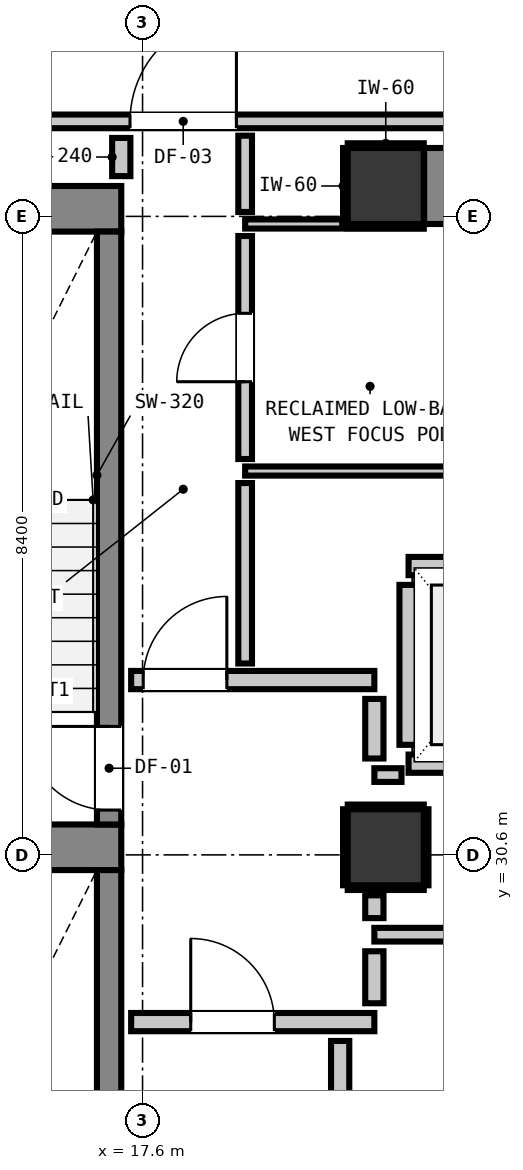
"""IFC4 building model, lengths in metres.
Left out: names, types, materials, properties, quantities, classifications, styles, units other than length and angle.
Written with IfcOpenShell. Run it as: python <this file> out.ifc"""

import sys

from ifc_helpers import new_model, si_unit, direction, frame, frame_2d, origin, origin_2d, place, context, subcontext, project, spatial, rectangle, extrude, element, fill, save


model = new_model("IFC4")
c1 = context("Model", 3, precision=1e-05, world=origin(), true_north=direction((0.0, 1.0)))
c2 = subcontext(c1, "Body", "Model", "MODEL_VIEW")
j1 = project(units=[si_unit("LENGTHUNIT", "METRE"), si_unit("PLANEANGLEUNIT", "RADIAN")], contexts=[c1])
p1 = place(None, origin())
s1 = spatial("IfcSite", under=j1, at=p1, CompositionType="ELEMENT")
p2 = place(p1, origin())
s2 = spatial("IfcBuilding", under=s1, at=p2, CompositionType="ELEMENT")
p3 = place(p2, frame((0.0, 0.0, 165.84)))
s3 = spatial("IfcBuildingStorey", under=s2, at=p3, CompositionType="ELEMENT", Elevation=165.84)
p4 = place(p3, frame((20.8, 39.4, 0.0), z_axis=(0.0, 0.0, 1.0), x_axis=(1.0, 0.0, 0.0)))
e1 = element("IfcColumn", 1, at=p4, inside=s3, PredefinedType="COLUMN", context=c2, shape_type="SweptSolid", body=[
    extrude(rectangle(XDim=1.0, YDim=1.0, at=origin_2d()), origin(), (0.0, 0.0, 1.0), 3.32),
])
p5 = place(p3, frame((13.24, 39.1, 0.0), z_axis=(0.0, 0.0, 1.0), x_axis=(1.0, 0.0, 0.0)))
e2 = element("IfcWall", 2, at=p5, inside=s3, PredefinedType="SHEAR", context=c2, shape_type="SweptSolid", body=[
    extrude(rectangle(XDim=4.08, YDim=0.6, at=frame_2d((2.04, 0.0))), origin(), (0.0, 0.0, 1.0), 3.32),
])
p6 = place(p3, frame((13.905, 30.7, 0.0), z_axis=(0.0, 0.0, 1.0), x_axis=(1.0, 0.0, 0.0)))
e3 = element("IfcWall", 3, at=p6, inside=s3, PredefinedType="SHEAR", context=c2, shape_type="SweptSolid", body=[
    extrude(rectangle(XDim=3.415, YDim=0.6, at=frame_2d((1.708, 0.0))), origin(), (0.0, 0.0, 1.0), 3.32),
])
p7 = place(p3, frame((21.305, 39.4, 0.0), z_axis=(0.0, 0.0, 1.0), x_axis=(1.0, 0.0, 0.0)))
e4 = element("IfcWall", 4, at=p7, inside=s3, PredefinedType="SHEAR", context=c2, shape_type="SweptSolid", body=[
    extrude(rectangle(XDim=7.39, YDim=1.0, at=frame_2d((3.695, 0.0))), origin(), (0.0, 0.0, 1.0), 3.32),
])
p8 = place(p3, frame((17.16, 31.0, 0.0), z_axis=(0.0, 0.0, 1.0), x_axis=(0.0, 1.0, 0.0)))
e5 = element("IfcWall", 5, at=p8, inside=s3, PredefinedType="SHEAR", context=c2, shape_type="SweptSolid", body=[
    extrude(rectangle(XDim=7.8, YDim=0.32, at=frame_2d((3.9, 0.0))), origin(), (0.0, 0.0, 1.0), 3.32),
])
p9 = place(p8, frame((0.19, 0.0, 0.0)))
e6 = element("IfcOpeningElement", 6, at=p9, cuts=e5, PredefinedType="OPENING", context=c2, shape_type="SweptSolid", body=[
    extrude(rectangle(XDim=1.1, YDim=2.15, at=frame_2d((0.55, 1.075))), frame((0.0, 0.17, 0.0), z_axis=(0.0, -1.0, 0.0), x_axis=(1.0, 0.0, 0.0)), (0.0, 0.0, 1.0), 0.34),
])
p10 = place(p3, frame((17.16, 22.5, 0.0), z_axis=(0.0, 0.0, 1.0), x_axis=(0.0, 1.0, 0.0)))
e7 = element("IfcWall", 7, at=p10, inside=s3, PredefinedType="SHEAR", context=c2, shape_type="SweptSolid", body=[
    extrude(rectangle(XDim=7.9, YDim=0.32, at=frame_2d((3.95, 0.0))), origin(), (0.0, 0.0, 1.0), 3.32),
])
p11 = place(p10, frame((0.29, 0.0, 0.0)))
e8 = element("IfcOpeningElement", 8, at=p11, cuts=e7, PredefinedType="OPENING", context=c2, shape_type="SweptSolid", body=[
    extrude(rectangle(XDim=1.1, YDim=2.15, at=frame_2d((0.55, 1.075))), frame((0.0, 0.17, 0.0), z_axis=(0.0, -1.0, 0.0), x_axis=(1.0, 0.0, 0.0)), (0.0, 0.0, 1.0), 0.34),
])
p12 = place(p3, frame((20.8, 30.7, 0.0), z_axis=(0.0, 0.0, 1.0), x_axis=(1.0, 0.0, 0.0)))
e9 = element("IfcColumn", 9, at=p12, inside=s3, PredefinedType="COLUMN", context=c2, shape_type="SweptSolid", body=[
    extrude(rectangle(XDim=1.0, YDim=1.0, at=origin_2d()), origin(), (0.0, 0.0, 1.0), 3.32),
])
for number, where, z_axis, x_axis in (
    (10, (21.1, 31.8, 0.0), (0.0, 0.0, 1.0), (1.0, 0.0, 0.0)),
    (11, (21.1, 34.4, 0.0), (0.0, 0.0, 1.0), (1.0, 0.0, 0.0)),
):
    element("IfcWall", number, at=place(p3, frame(where, z_axis=z_axis, x_axis=x_axis)), inside=s3, PredefinedType="PARTITIONING", context=c2, shape_type="SweptSolid", body=[
        extrude(rectangle(XDim=2.2, YDim=0.24, at=frame_2d((1.1, 0.0))), origin(), (0.0, 0.0, 1.0), 3.08),
    ])
p13 = place(p3, frame((21.1, 32.048, 0.0), z_axis=(0.0, 0.0, 1.0), x_axis=(0.0, 1.0, 0.0)))
e12 = element("IfcWall", 12, at=p13, inside=s3, PredefinedType="PARTITIONING", context=c2, shape_type="SweptSolid", body=[
    extrude(rectangle(XDim=2.104, YDim=0.24, at=frame_2d((1.052, 0.0))), origin(), (0.0, 0.0, 1.0), 2.315),
])
p14 = place(p3, frame((17.45, 28.4, 0.0), z_axis=(0.0, 0.0, 1.0), x_axis=(1.0, 0.0, 0.0)))
e13 = element("IfcWall", 13, at=p14, inside=s3, PredefinedType="PARTITIONING", context=c2, shape_type="SweptSolid", body=[
    extrude(rectangle(XDim=3.2, YDim=0.24, at=frame_2d((1.6, 0.0))), origin(), (0.0, 0.0, 1.0), 3.08),
])
p15 = place(p14, frame((0.784, 0.0, 0.0)))
e14 = element("IfcOpeningElement", 14, at=p15, cuts=e13, PredefinedType="OPENING", context=c2, shape_type="SweptSolid", body=[
    extrude(rectangle(XDim=1.1, YDim=2.15, at=frame_2d((0.55, 1.075))), frame((0.0, 0.13, 0.0), z_axis=(0.0, -1.0, 0.0), x_axis=(1.0, 0.0, 0.0)), (0.0, 0.0, 1.0), 0.26),
])
p16 = place(p3, frame((17.45, 32.9, 0.0), z_axis=(0.0, 0.0, 1.0), x_axis=(1.0, 0.0, 0.0)))
e15 = element("IfcWall", 15, at=p16, inside=s3, PredefinedType="PARTITIONING", context=c2, shape_type="SweptSolid", body=[
    extrude(rectangle(XDim=3.2, YDim=0.24, at=frame_2d((1.6, 0.0))), origin(), (0.0, 0.0, 1.0), 3.08),
])
p17 = place(p16, frame((0.159, 0.0, 0.0)))
e16 = element("IfcOpeningElement", 16, at=p17, cuts=e15, PredefinedType="OPENING", context=c2, shape_type="SweptSolid", body=[
    extrude(rectangle(XDim=1.1, YDim=2.15, at=frame_2d((0.55, 1.075))), frame((0.0, 0.13, 0.0), z_axis=(0.0, -1.0, 0.0), x_axis=(1.0, 0.0, 0.0)), (0.0, 0.0, 1.0), 0.26),
])
p18 = place(p3, frame((20.65, 29.55, 0.0), z_axis=(0.0, 0.0, 1.0), x_axis=(1.0, 0.0, 0.0)))
e17 = element("IfcWall", 17, at=p18, inside=s3, PredefinedType="PARTITIONING", context=c2, shape_type="SweptSolid", body=[
    extrude(rectangle(XDim=9.325, YDim=0.18, at=frame_2d((4.663, 0.0))), origin(), (0.0, 0.0, 1.0), 3.08),
])
p19 = place(p3, frame((20.65, 31.65, 0.0), z_axis=(0.0, 0.0, 1.0), x_axis=(1.0, 0.0, 0.0)))
e18 = element("IfcWall", 18, at=p19, inside=s3, PredefinedType="PARTITIONING", context=c2, shape_type="SweptSolid", body=[
    extrude(rectangle(XDim=0.357, YDim=0.18, at=frame_2d((0.179, 0.0))), origin(), (0.0, 0.0, 1.0), 3.08),
])
p20 = place(p3, frame((3.207, 40.25, 0.0), z_axis=(0.0, 0.0, 1.0), x_axis=(1.0, 0.0, 0.0)))
e19 = element("IfcWall", 19, at=p20, inside=s3, PredefinedType="PARTITIONING", context=c2, shape_type="SweptSolid", body=[
    extrude(rectangle(XDim=39.386, YDim=0.18, at=frame_2d((19.693, 0.0))), origin(), (0.0, 0.0, 1.0), 3.08),
])
p21 = place(p20, frame((14.228, 0.0, 0.0)))
e20 = element("IfcOpeningElement", 20, at=p21, cuts=e19, PredefinedType="OPENING", context=c2, shape_type="SweptSolid", body=[
    extrude(rectangle(XDim=1.4, YDim=2.15, at=frame_2d((0.7, 1.075))), frame((0.0, 0.1, 0.0), z_axis=(0.0, -1.0, 0.0), x_axis=(1.0, 0.0, 0.0)), (0.0, 0.0, 1.0), 0.2),
])
p22 = place(p20, frame((7.243, 0.0, 0.0)))
e21 = element("IfcOpeningElement", 21, at=p22, cuts=e19, PredefinedType="OPENING", context=c2, shape_type="SweptSolid", body=[
    extrude(rectangle(XDim=1.4, YDim=2.15, at=frame_2d((0.7, 1.075))), frame((0.0, 0.1, 0.0), z_axis=(0.0, -1.0, 0.0), x_axis=(1.0, 0.0, 0.0)), (0.0, 0.0, 1.0), 0.2),
])
p23 = place(p20, frame((34.843, 0.0, 0.0)))
e22 = element("IfcOpeningElement", 22, at=p23, cuts=e19, PredefinedType="OPENING", context=c2, shape_type="SweptSolid", body=[
    extrude(rectangle(XDim=1.4, YDim=2.15, at=frame_2d((0.7, 1.075))), frame((0.0, 0.1, 0.0), z_axis=(0.0, -1.0, 0.0), x_axis=(1.0, 0.0, 0.0)), (0.0, 0.0, 1.0), 0.2),
])
p24 = place(p3, frame((18.95, 35.65, 0.0), z_axis=(0.0, 0.0, 1.0), x_axis=(1.0, 0.0, 0.0)))
e23 = element("IfcWall", 23, at=p24, inside=s3, PredefinedType="PARTITIONING", context=c2, shape_type="SweptSolid", body=[
    extrude(rectangle(XDim=11.025, YDim=0.12, at=frame_2d((5.513, 0.0))), origin(), (0.0, 0.0, 1.0), 3.08),
])
p25 = place(p3, frame((18.95, 38.9, 0.0), z_axis=(0.0, 0.0, 1.0), x_axis=(1.0, 0.0, 0.0)))
e24 = element("IfcWall", 24, at=p25, inside=s3, PredefinedType="PARTITIONING", context=c2, shape_type="SweptSolid", body=[
    extrude(rectangle(XDim=1.278, YDim=0.12, at=frame_2d((0.639, 0.0))), origin(), (0.0, 0.0, 1.0), 3.08),
])
p26 = place(p3, frame((17.32, 39.53, 0.0), z_axis=(0.0, 0.0, 1.0), x_axis=(0.0, 1.0, 0.0)))
e25 = element("IfcWall", 25, at=p26, inside=s3, PredefinedType="PARTITIONING", context=c2, shape_type="SweptSolid", body=[
    extrude(rectangle(XDim=0.502, YDim=0.24, at=frame_2d((0.251, 0.0))), origin(), (0.0, 0.0, 1.0), 3.08),
])
p27 = place(p3, frame((20.2, 22.586, 0.0), z_axis=(0.0, 0.0, 1.0), x_axis=(0.0, 1.0, 0.0)))
e26 = element("IfcWall", 26, at=p27, inside=s3, PredefinedType="PARTITIONING", context=c2, shape_type="SweptSolid", body=[
    extrude(rectangle(XDim=5.566, YDim=0.24, at=frame_2d((2.783, 0.0))), origin(), (0.0, 0.0, 1.0), 3.08),
])
p28 = place(p3, frame((20.65, 28.648, 0.0), z_axis=(0.0, 0.0, 1.0), x_axis=(0.0, 1.0, 0.0)))
e27 = element("IfcWall", 27, at=p28, inside=s3, PredefinedType="PARTITIONING", context=c2, shape_type="SweptSolid", body=[
    extrude(rectangle(XDim=0.684, YDim=0.24, at=frame_2d((0.342, 0.0))), origin(), (0.0, 0.0, 1.0), 2.315),
])
p29 = place(p3, frame((20.65, 29.768, 0.0), z_axis=(0.0, 0.0, 1.0), x_axis=(0.0, 1.0, 0.0)))
e28 = element("IfcWall", 28, at=p29, inside=s3, PredefinedType="PARTITIONING", context=c2, shape_type="SweptSolid", body=[
    extrude(rectangle(XDim=0.3, YDim=0.24, at=frame_2d((0.15, 0.0))), origin(), (0.0, 0.0, 1.0), 2.315),
])
p30 = place(p3, frame((20.65, 31.868, 0.0), z_axis=(0.0, 0.0, 1.0), x_axis=(0.0, 1.0, 0.0)))
e29 = element("IfcWall", 29, at=p30, inside=s3, PredefinedType="PARTITIONING", context=c2, shape_type="SweptSolid", body=[
    extrude(rectangle(XDim=0.784, YDim=0.24, at=frame_2d((0.392, 0.0))), origin(), (0.0, 0.0, 1.0), 2.315),
])
p31 = place(p3, frame((18.95, 33.118, 0.0), z_axis=(0.0, 0.0, 1.0), x_axis=(0.0, 1.0, 0.0)))
e30 = element("IfcWall", 30, at=p31, inside=s3, PredefinedType="PARTITIONING", context=c2, shape_type="SweptSolid", body=[
    extrude(rectangle(XDim=2.374, YDim=0.18, at=frame_2d((1.187, 0.0))), origin(), (0.0, 0.0, 1.0), 3.08),
])
p32 = place(p3, frame((18.95, 35.808, 0.0), z_axis=(0.0, 0.0, 1.0), x_axis=(0.0, 1.0, 0.0)))
e31 = element("IfcWall", 31, at=p32, inside=s3, PredefinedType="PARTITIONING", context=c2, shape_type="SweptSolid", body=[
    extrude(rectangle(XDim=2.934, YDim=0.18, at=frame_2d((1.467, 0.0))), origin(), (0.0, 0.0, 1.0), 3.08),
])
p33 = place(p32, frame((1.017, 0.0, 0.0)))
e32 = element("IfcOpeningElement", 32, at=p33, cuts=e31, PredefinedType="OPENING", context=c2, shape_type="SweptSolid", body=[
    extrude(rectangle(XDim=0.9, YDim=2.1, at=frame_2d((0.45, 1.05))), frame((0.0, 0.1, 0.0), z_axis=(0.0, -1.0, 0.0), x_axis=(1.0, 0.0, 0.0)), (0.0, 0.0, 1.0), 0.2),
])
p34 = place(p3, frame((18.95, 39.058, 0.0), z_axis=(0.0, 0.0, 1.0), x_axis=(0.0, 1.0, 0.0)))
e33 = element("IfcWall", 33, at=p34, inside=s3, PredefinedType="PARTITIONING", context=c2, shape_type="SweptSolid", body=[
    extrude(rectangle(XDim=1.004, YDim=0.18, at=frame_2d((0.502, 0.0))), origin(), (0.0, 0.0, 1.0), 3.08),
])
for number, where, z_axis, x_axis in (
    (34, (20.3, 38.868, 0.0), (0.0, 0.0, 1.0), (1.0, 0.0, 0.0)),
    (35, (20.3, 39.932, 0.0), (0.0, 0.0, 1.0), (1.0, 0.0, 0.0)),
    (36, (20.268, 38.9, 0.0), (0.0, 0.0, 1.0), (0.0, 1.0, 0.0)),
    (37, (20.3, 30.168, 0.0), (0.0, 0.0, 1.0), (1.0, 0.0, 0.0)),
    (38, (20.3, 31.232, 0.0), (0.0, 0.0, 1.0), (1.0, 0.0, 0.0)),
    (39, (20.268, 30.2, 0.0), (0.0, 0.0, 1.0), (0.0, 1.0, 0.0)),
    (40, (21.332, 30.2, 0.0), (0.0, 0.0, 1.0), (0.0, 1.0, 0.0)),
):
    element("IfcWall", number, at=place(p3, frame(where, z_axis=z_axis, x_axis=x_axis)), inside=s3, PredefinedType="PARTITIONING", context=c2, shape_type="SweptSolid", body=[
        extrude(rectangle(XDim=1.0, YDim=0.06, at=frame_2d((0.5, 0.0))), origin(), (0.0, 0.0, 1.0), 1.45),
    ])
p35 = place(p9, origin())
e41 = element("IfcDoor", 41, at=p35, inside=s3, OperationType="SINGLE_SWING_RIGHT", PredefinedType="DOOR", context=c2, shape_type="SweptSolid", body=[
    extrude(rectangle(XDim=1.1, YDim=2.15, at=frame_2d((0.55, 1.075))), frame((0.0, 0.025, 0.0), z_axis=(0.0, -1.0, 0.0), x_axis=(1.0, 0.0, 0.0)), (0.0, 0.0, 1.0), 0.05),
])
fill(e6, e41)
p36 = place(p15, origin())
e42 = element("IfcDoor", 42, at=p36, inside=s3, OperationType="SINGLE_SWING_LEFT", PredefinedType="DOOR", context=c2, shape_type="SweptSolid", body=[
    extrude(rectangle(XDim=1.1, YDim=2.15, at=frame_2d((0.55, 1.075))), frame((0.0, 0.025, 0.0), z_axis=(0.0, -1.0, 0.0), x_axis=(1.0, 0.0, 0.0)), (0.0, 0.0, 1.0), 0.05),
])
fill(e14, e42)
p37 = place(p17, origin())
e43 = element("IfcDoor", 43, at=p37, inside=s3, OperationType="SINGLE_SWING_RIGHT", PredefinedType="DOOR", context=c2, shape_type="SweptSolid", body=[
    extrude(rectangle(XDim=1.1, YDim=2.15, at=frame_2d((0.55, 1.075))), frame((0.0, 0.025, 0.0), z_axis=(0.0, -1.0, 0.0), x_axis=(1.0, 0.0, 0.0)), (0.0, 0.0, 1.0), 0.05),
])
fill(e16, e43)
p38 = place(p21, origin())
e44 = element("IfcDoor", 44, at=p38, inside=s3, OperationType="SINGLE_SWING_RIGHT", PredefinedType="DOOR", context=c2, shape_type="SweptSolid", body=[
    extrude(rectangle(XDim=1.4, YDim=2.15, at=frame_2d((0.7, 1.075))), frame((0.0, 0.025, 0.0), z_axis=(0.0, -1.0, 0.0), x_axis=(1.0, 0.0, 0.0)), (0.0, 0.0, 1.0), 0.05),
])
fill(e20, e44)
p39 = place(p33, origin())
e45 = element("IfcDoor", 45, at=p39, inside=s3, OperationType="SINGLE_SWING_LEFT", PredefinedType="DOOR", context=c2, shape_type="SweptSolid", body=[
    extrude(rectangle(XDim=0.9, YDim=2.1, at=frame_2d((0.45, 1.05))), frame((0.0, 0.025, 0.0), z_axis=(0.0, -1.0, 0.0), x_axis=(1.0, 0.0, 0.0)), (0.0, 0.0, 1.0), 0.05),
])
fill(e32, e45)
save(model, sys.argv[1])
